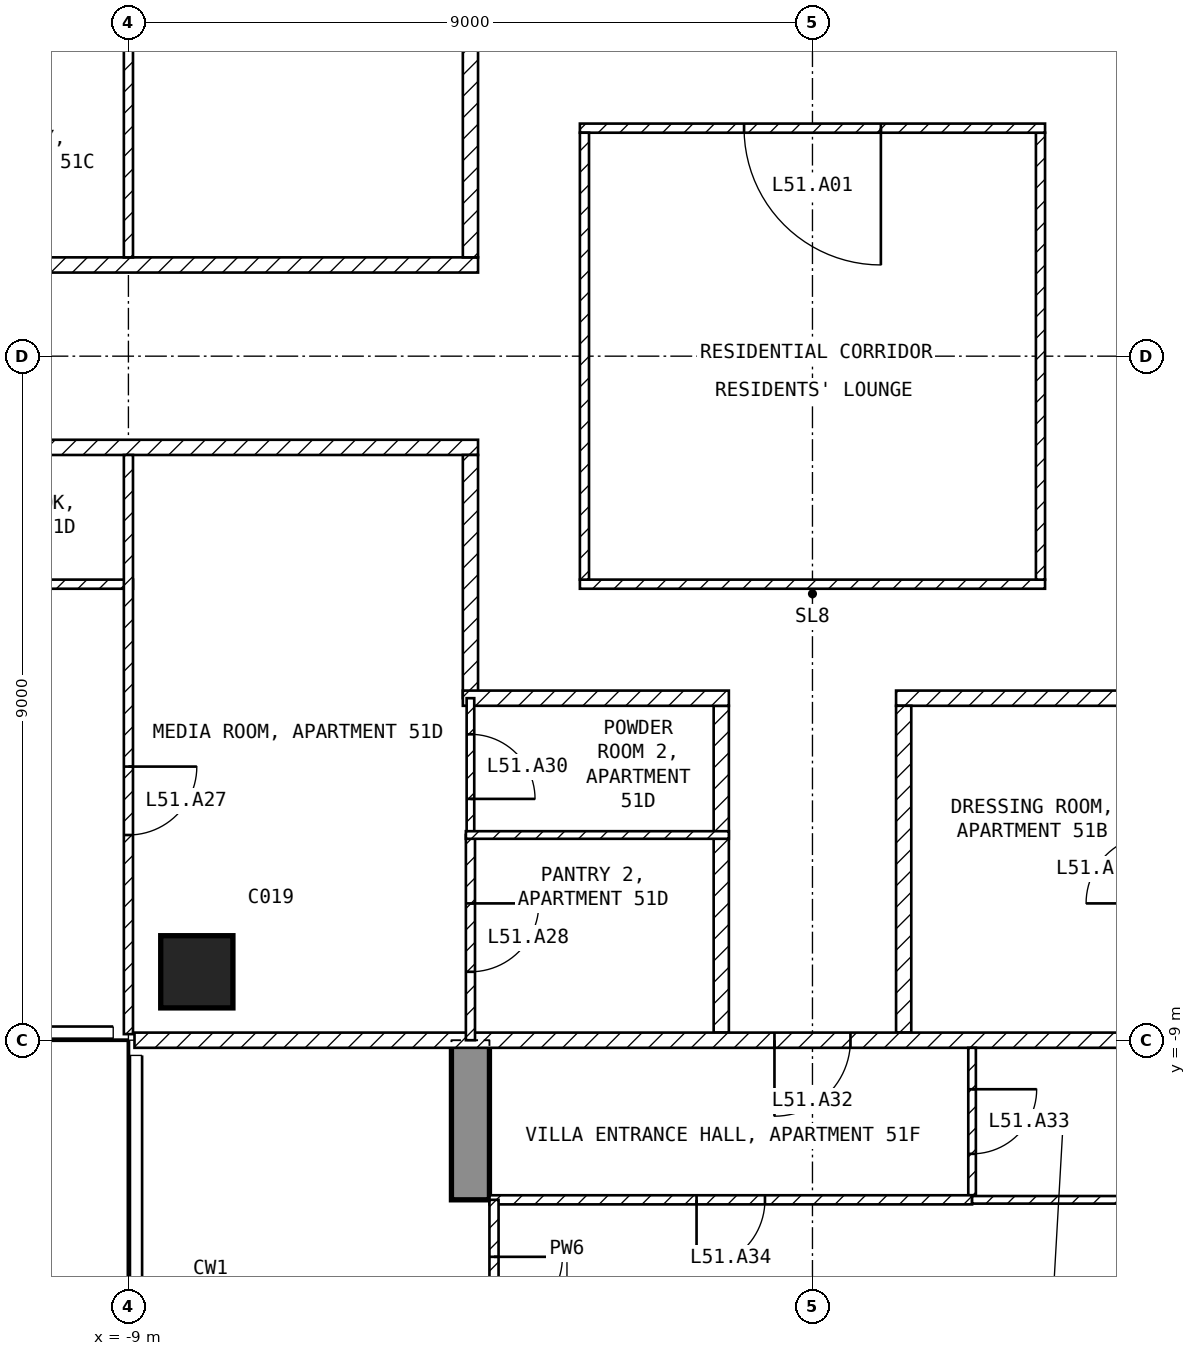
"""IFC4 building model, lengths in metres.
Left out: names, types, materials, properties, quantities, classifications, styles, units other than length and angle.
Written with IfcOpenShell. Run it as: python <this file> out.ifc"""

import sys

from ifc_helpers import new_model, si_unit, direction, frame, frame_2d, origin, origin_2d, place, context, subcontext, project, spatial, polyline, rectangle, outline, extrude, element, fill, save


model = new_model("IFC4")
c1 = context("Model", 3, precision=1e-05, world=origin(), true_north=direction((0.0, 1.0)))
c2 = subcontext(c1, "Body", "Model", "MODEL_VIEW")
j1 = project(units=[si_unit("LENGTHUNIT", "METRE"), si_unit("PLANEANGLEUNIT", "RADIAN")], contexts=[c1])
p1 = place(None, origin())
s1 = spatial("IfcSite", under=j1, at=p1, CompositionType="ELEMENT")
p2 = place(p1, origin())
s2 = spatial("IfcBuilding", under=s1, at=p2, CompositionType="ELEMENT")
p3 = place(p2, frame((0.0, 0.0, 205.1)))
s3 = spatial("IfcBuildingStorey", under=s2, at=p3, CompositionType="ELEMENT", Elevation=205.1)
p4 = place(p3, frame((-8.1, -8.1, -0.25), z_axis=(0.0, 0.0, 1.0), x_axis=(1.0, 0.0, 0.0)))
e1 = element("IfcColumn", 1, at=p4, inside=s3, PredefinedType="COLUMN", context=c2, shape_type="SweptSolid", body=[
    extrude(rectangle(XDim=0.95, YDim=0.95, at=origin_2d()), origin(), (0.0, 0.0, 1.0), 3.5),
])
p5 = place(p3, frame((-4.75, -20.225, -0.25), z_axis=(1.0, 0.0, 0.0), x_axis=(0.0, 1.0, 0.0)))
e2 = element("IfcWall", 2, at=p5, inside=s3, PredefinedType="SHEAR", context=c2, shape_type="SweptSolid", body=[
    extrude(outline(polyline([(0.0, 0.0), (6.725, 0.0), (6.725, 2.65), (9.125, 2.65), (9.125, 0.0), (11.225, 0.0), (11.225, 3.5), (0.0, 3.5), (0.0, 0.0)])), origin(), (0.0, 0.0, 1.0), 0.5),
])
p6 = place(p3, frame((-3.06, -3.0, 0.0), z_axis=(0.0, 0.0, 1.0), x_axis=(1.0, 0.0, 0.0)))
e3 = element("IfcWall", 3, at=p6, inside=s3, PredefinedType="PARTITIONING", context=c2, shape_type="SweptSolid", body=[
    extrude(rectangle(XDim=6.12, YDim=0.12, at=frame_2d((3.06, 0.0))), origin(), (0.0, 0.0, 1.0), 3.25),
])
p7 = place(p3, frame((3.0, -2.94, 0.0), z_axis=(0.0, 0.0, 1.0), x_axis=(0.0, 1.0, 0.0)))
e4 = element("IfcWall", 4, at=p7, inside=s3, PredefinedType="PARTITIONING", context=c2, shape_type="SweptSolid", body=[
    extrude(rectangle(XDim=5.88, YDim=0.12, at=frame_2d((2.94, 0.0))), origin(), (0.0, 0.0, 1.0), 3.25),
])
p8 = place(p3, frame((3.06, 3.0, 0.0), z_axis=(0.0, 0.0, 1.0), x_axis=(-1.0, 0.0, 0.0)))
e5 = element("IfcWall", 5, at=p8, inside=s3, PredefinedType="PARTITIONING", context=c2, shape_type="SweptSolid", body=[
    extrude(rectangle(XDim=6.12, YDim=0.12, at=frame_2d((3.06, 0.0))), origin(), (0.0, 0.0, 1.0), 3.25),
])
p9 = place(p8, frame((2.16, 0.0, 0.0)))
e6 = element("IfcOpeningElement", 6, at=p9, cuts=e5, PredefinedType="OPENING", context=c2, shape_type="SweptSolid", body=[
    extrude(rectangle(XDim=1.8, YDim=2.1, at=frame_2d((0.9, 1.05))), frame((0.0, 0.07, 0.0), z_axis=(0.0, -1.0, 0.0), x_axis=(1.0, 0.0, 0.0)), (0.0, 0.0, 1.0), 0.14),
])
p10 = place(p3, frame((-3.0, 2.94, 0.0), z_axis=(0.0, 0.0, 1.0), x_axis=(0.0, -1.0, 0.0)))
e7 = element("IfcWall", 7, at=p10, inside=s3, PredefinedType="PARTITIONING", context=c2, shape_type="SweptSolid", body=[
    extrude(rectangle(XDim=5.88, YDim=0.12, at=frame_2d((2.94, 0.0))), origin(), (0.0, 0.0, 1.0), 3.25),
])
p11 = place(p3, frame((4.6, -4.5, 0.0), z_axis=(0.0, 0.0, 1.0), x_axis=(-1.0, 0.0, 0.0)))
e8 = element("IfcWall", 8, at=p11, inside=s3, PredefinedType="PARTITIONING", context=c2, shape_type="SweptSolid", body=[
    extrude(rectangle(XDim=3.5, YDim=0.2, at=frame_2d((1.75, 0.0))), origin(), (0.0, 0.0, 1.0), 3.25),
])
p12 = place(p3, frame((1.2, -4.6, 0.0), z_axis=(0.0, 0.0, 1.0), x_axis=(0.0, -1.0, 0.0)))
e9 = element("IfcWall", 9, at=p12, inside=s3, PredefinedType="PARTITIONING", context=c2, shape_type="SweptSolid", body=[
    extrude(rectangle(XDim=4.3, YDim=0.2, at=frame_2d((2.15, 0.0))), origin(), (0.0, 0.0, 1.0), 3.25),
])
p13 = place(p3, frame((-21.6, 1.2, 0.0), z_axis=(0.0, 0.0, 1.0), x_axis=(1.0, 0.0, 0.0)))
e10 = element("IfcWall", 10, at=p13, inside=s3, PredefinedType="PARTITIONING", context=c2, shape_type="SweptSolid", body=[
    extrude(rectangle(XDim=17.2, YDim=0.2, at=frame_2d((8.6, 0.0))), origin(), (0.0, 0.0, 1.0), 3.25),
])
p14 = place(p13, frame((7.75, 0.0, 0.0)))
e11 = element("IfcOpeningElement", 11, at=p14, cuts=e10, PredefinedType="OPENING", context=c2, shape_type="SweptSolid", body=[
    extrude(rectangle(XDim=1.0, YDim=2.1, at=frame_2d((0.5, 1.05))), frame((0.0, 0.11, 0.0), z_axis=(0.0, -1.0, 0.0), x_axis=(1.0, 0.0, 0.0)), (0.0, 0.0, 1.0), 0.22),
])
p15 = place(p3, frame((-4.5, 1.3, 0.0), z_axis=(0.0, 0.0, 1.0), x_axis=(0.0, 1.0, 0.0)))
e12 = element("IfcWall", 12, at=p15, inside=s3, PredefinedType="PARTITIONING", context=c2, shape_type="SweptSolid", body=[
    extrude(rectangle(XDim=3.2, YDim=0.2, at=frame_2d((1.6, 0.0))), origin(), (0.0, 0.0, 1.0), 3.25),
])
p16 = place(p3, frame((-4.4, -1.2, 0.0), z_axis=(0.0, 0.0, 1.0), x_axis=(-1.0, 0.0, 0.0)))
e13 = element("IfcWall", 13, at=p16, inside=s3, PredefinedType="PARTITIONING", context=c2, shape_type="SweptSolid", body=[
    extrude(rectangle(XDim=17.2, YDim=0.2, at=frame_2d((8.6, 0.0))), origin(), (0.0, 0.0, 1.0), 3.25),
])
p17 = place(p16, frame((9.125, 0.0, 0.0)))
e14 = element("IfcOpeningElement", 14, at=p17, cuts=e13, PredefinedType="OPENING", context=c2, shape_type="SweptSolid", body=[
    extrude(rectangle(XDim=1.0, YDim=2.1, at=frame_2d((0.5, 1.05))), frame((0.0, 0.11, 0.0), z_axis=(0.0, -1.0, 0.0), x_axis=(1.0, 0.0, 0.0)), (0.0, 0.0, 1.0), 0.22),
])
p18 = place(p3, frame((-4.5, -4.5, 0.0), z_axis=(0.0, 0.0, 1.0), x_axis=(0.0, 1.0, 0.0)))
e15 = element("IfcWall", 15, at=p18, inside=s3, PredefinedType="PARTITIONING", context=c2, shape_type="SweptSolid", body=[
    extrude(rectangle(XDim=3.2, YDim=0.2, at=frame_2d((1.6, 0.0))), origin(), (0.0, 0.0, 1.0), 3.25),
])
p19 = place(p3, frame((-1.2, -8.9, 0.0), z_axis=(0.0, 0.0, 1.0), x_axis=(0.0, 1.0, 0.0)))
e16 = element("IfcWall", 16, at=p19, inside=s3, PredefinedType="PARTITIONING", context=c2, shape_type="SweptSolid", body=[
    extrude(rectangle(XDim=4.3, YDim=0.2, at=frame_2d((2.15, 0.0))), origin(), (0.0, 0.0, 1.0), 3.25),
])
p20 = place(p3, frame((-1.1, -4.5, 0.0), z_axis=(0.0, 0.0, 1.0), x_axis=(-1.0, 0.0, 0.0)))
e17 = element("IfcWall", 17, at=p20, inside=s3, PredefinedType="PARTITIONING", context=c2, shape_type="SweptSolid", body=[
    extrude(rectangle(XDim=3.5, YDim=0.2, at=frame_2d((1.75, 0.0))), origin(), (0.0, 0.0, 1.0), 3.25),
])
p21 = place(p3, frame((8.92, -9.0, 0.0), z_axis=(0.0, 0.0, 1.0), x_axis=(-1.0, 0.0, 0.0)))
e18 = element("IfcWall", 18, at=p21, inside=s3, PredefinedType="PARTITIONING", context=c2, shape_type="SweptSolid", body=[
    extrude(rectangle(XDim=17.84, YDim=0.2, at=frame_2d((8.92, 0.0))), origin(), (0.0, 0.0, 1.0), 3.25),
])
p22 = place(p21, frame((8.42, 0.0, 0.0)))
e19 = element("IfcOpeningElement", 19, at=p22, cuts=e18, PredefinedType="OPENING", context=c2, shape_type="SweptSolid", body=[
    extrude(rectangle(XDim=1.0, YDim=2.1, at=frame_2d((0.5, 1.05))), frame((0.0, 0.11, 0.0), z_axis=(0.0, -1.0, 0.0), x_axis=(1.0, 0.0, 0.0)), (0.0, 0.0, 1.0), 0.22),
])
p23 = place(p3, frame((-9.0, 8.92, 0.0), z_axis=(0.0, 0.0, 1.0), x_axis=(0.0, -1.0, 0.0)))
e20 = element("IfcWall", 20, at=p23, inside=s3, PredefinedType="PARTITIONING", context=c2, shape_type="SweptSolid", body=[
    extrude(rectangle(XDim=7.62, YDim=0.12, at=frame_2d((3.81, 0.0))), origin(), (0.0, 0.0, 1.0), 3.25),
])
p24 = place(p23, frame((2.52, 0.0, 0.0)))
e21 = element("IfcOpeningElement", 21, at=p24, cuts=e20, PredefinedType="OPENING", context=c2, shape_type="SweptSolid", body=[
    extrude(rectangle(XDim=0.9, YDim=2.1, at=frame_2d((0.45, 1.05))), frame((0.0, 0.07, 0.0), z_axis=(0.0, -1.0, 0.0), x_axis=(1.0, 0.0, 0.0)), (0.0, 0.0, 1.0), 0.14),
])
p25 = place(p3, frame((-8.94, -3.0, 0.0), z_axis=(0.0, 0.0, 1.0), x_axis=(-1.0, 0.0, 0.0)))
e22 = element("IfcWall", 22, at=p25, inside=s3, PredefinedType="PARTITIONING", context=c2, shape_type="SweptSolid", body=[
    extrude(rectangle(XDim=6.81, YDim=0.12, at=frame_2d((3.405, 0.0))), origin(), (0.0, 0.0, 1.0), 3.25),
])
p26 = place(p25, frame((4.11, 0.0, 0.0)))
e23 = element("IfcOpeningElement", 23, at=p26, cuts=e22, PredefinedType="OPENING", context=c2, shape_type="SweptSolid", body=[
    extrude(rectangle(XDim=0.9, YDim=2.1, at=frame_2d((0.45, 1.05))), frame((0.0, 0.07, 0.0), z_axis=(0.0, -1.0, 0.0), x_axis=(1.0, 0.0, 0.0)), (0.0, 0.0, 1.0), 0.14),
])
p27 = place(p3, frame((-9.0, -1.3, 0.0), z_axis=(0.0, 0.0, 1.0), x_axis=(0.0, -1.0, 0.0)))
e24 = element("IfcWall", 24, at=p27, inside=s3, PredefinedType="PARTITIONING", context=c2, shape_type="SweptSolid", body=[
    extrude(rectangle(XDim=7.62, YDim=0.12, at=frame_2d((3.81, 0.0))), origin(), (0.0, 0.0, 1.0), 3.25),
])
p28 = place(p27, frame((4.1, 0.0, 0.0)))
e25 = element("IfcOpeningElement", 25, at=p28, cuts=e24, PredefinedType="OPENING", context=c2, shape_type="SweptSolid", body=[
    extrude(rectangle(XDim=0.9, YDim=2.1, at=frame_2d((0.45, 1.05))), frame((0.0, 0.07, 0.0), z_axis=(0.0, -1.0, 0.0), x_axis=(1.0, 0.0, 0.0)), (0.0, 0.0, 1.0), 0.14),
])
p29 = place(p3, frame((-4.5, -4.5, 0.0), z_axis=(0.0, 0.0, 1.0), x_axis=(0.0, -1.0, 0.0)))
e26 = element("IfcWall", 26, at=p29, inside=s3, PredefinedType="PARTITIONING", context=c2, shape_type="SweptSolid", body=[
    extrude(rectangle(XDim=1.8, YDim=0.1, at=frame_2d((0.9, 0.0))), origin(), (0.0, 0.0, 1.0), 3.25),
])
p30 = place(p29, frame((0.475, 0.0, 0.0)))
e27 = element("IfcOpeningElement", 27, at=p30, cuts=e26, PredefinedType="OPENING", context=c2, shape_type="SweptSolid", body=[
    extrude(rectangle(XDim=0.85, YDim=2.1, at=frame_2d((0.425, 1.05))), frame((0.0, 0.06, 0.0), z_axis=(0.0, -1.0, 0.0), x_axis=(1.0, 0.0, 0.0)), (0.0, 0.0, 1.0), 0.12),
])
p31 = place(p3, frame((-4.5, -6.3, 0.0), z_axis=(0.0, 0.0, 1.0), x_axis=(0.0, -1.0, 0.0)))
e28 = element("IfcWall", 28, at=p31, inside=s3, PredefinedType="PARTITIONING", context=c2, shape_type="SweptSolid", body=[
    extrude(rectangle(XDim=2.7, YDim=0.12, at=frame_2d((1.35, 0.0))), origin(), (0.0, 0.0, 1.0), 3.25),
])
p32 = place(p31, frame((0.9, 0.0, 0.0)))
e29 = element("IfcOpeningElement", 29, at=p32, cuts=e28, PredefinedType="OPENING", context=c2, shape_type="SweptSolid", body=[
    extrude(rectangle(XDim=0.9, YDim=2.1, at=frame_2d((0.45, 1.05))), frame((0.0, 0.07, 0.0), z_axis=(0.0, -1.0, 0.0), x_axis=(1.0, 0.0, 0.0)), (0.0, 0.0, 1.0), 0.14),
])
p33 = place(p3, frame((-1.1, -6.3, 0.0), z_axis=(0.0, 0.0, 1.0), x_axis=(-1.0, 0.0, 0.0)))
e30 = element("IfcWall", 30, at=p33, inside=s3, PredefinedType="PARTITIONING", context=c2, shape_type="SweptSolid", body=[
    extrude(rectangle(XDim=3.46, YDim=0.1, at=frame_2d((1.73, 0.0))), origin(), (0.0, 0.0, 1.0), 3.25),
])
p34 = place(p3, frame((2.1, -9.1, 0.0), z_axis=(0.0, 0.0, 1.0), x_axis=(0.0, -1.0, 0.0)))
e31 = element("IfcWall", 31, at=p34, inside=s3, PredefinedType="PARTITIONING", context=c2, shape_type="SweptSolid", body=[
    extrude(rectangle(XDim=1.94, YDim=0.1, at=frame_2d((0.97, 0.0))), origin(), (0.0, 0.0, 1.0), 3.25),
])
p35 = place(p34, frame((0.545, 0.0, 0.0)))
e32 = element("IfcOpeningElement", 32, at=p35, cuts=e31, PredefinedType="OPENING", context=c2, shape_type="SweptSolid", body=[
    extrude(rectangle(XDim=0.85, YDim=2.1, at=frame_2d((0.425, 1.05))), frame((0.0, 0.06, 0.0), z_axis=(0.0, -1.0, 0.0), x_axis=(1.0, 0.0, 0.0)), (0.0, 0.0, 1.0), 0.12),
])
p36 = place(p3, frame((2.1, -11.1, 0.0), z_axis=(0.0, 0.0, 1.0), x_axis=(-1.0, 0.0, 0.0)))
e33 = element("IfcWall", 33, at=p36, inside=s3, PredefinedType="PARTITIONING", context=c2, shape_type="SweptSolid", body=[
    extrude(rectangle(XDim=6.35, YDim=0.12, at=frame_2d((3.175, 0.0))), origin(), (0.0, 0.0, 1.0), 3.25),
])
p37 = place(p36, frame((2.725, 0.0, 0.0)))
e34 = element("IfcOpeningElement", 34, at=p37, cuts=e33, PredefinedType="OPENING", context=c2, shape_type="SweptSolid", body=[
    extrude(rectangle(XDim=0.9, YDim=2.1, at=frame_2d((0.45, 1.05))), frame((0.0, 0.07, 0.0), z_axis=(0.0, -1.0, 0.0), x_axis=(1.0, 0.0, 0.0)), (0.0, 0.0, 1.0), 0.14),
])
p38 = place(p3, frame((4.25, -11.1, 0.0), z_axis=(0.0, 0.0, 1.0), x_axis=(-1.0, 0.0, 0.0)))
e35 = element("IfcWall", 35, at=p38, inside=s3, PredefinedType="PARTITIONING", context=c2, shape_type="SweptSolid", body=[
    extrude(rectangle(XDim=2.15, YDim=0.1, at=frame_2d((1.075, 0.0))), origin(), (0.0, 0.0, 1.0), 3.25),
])
p39 = place(p3, frame((-4.19, -11.1, 0.0), z_axis=(0.0, 0.0, 1.0), x_axis=(0.0, -1.0, 0.0)))
e36 = element("IfcWall", 36, at=p39, inside=s3, PredefinedType="PARTITIONING", context=c2, shape_type="SweptSolid", body=[
    extrude(rectangle(XDim=2.4, YDim=0.12, at=frame_2d((1.2, 0.0))), origin(), (0.0, 0.0, 1.0), 2.4),
])
p40 = place(p39, frame((0.75, 0.0, 0.0)))
e37 = element("IfcOpeningElement", 37, at=p40, cuts=e36, PredefinedType="OPENING", context=c2, shape_type="SweptSolid", body=[
    extrude(rectangle(XDim=0.9, YDim=2.1, at=frame_2d((0.45, 1.05))), frame((0.0, 0.07, 0.0), z_axis=(0.0, -1.0, 0.0), x_axis=(1.0, 0.0, 0.0)), (0.0, 0.0, 1.0), 0.14),
])
p41 = place(p9, origin())
e38 = element("IfcDoor", 38, at=p41, inside=s3, OperationType="SINGLE_SWING_LEFT", PredefinedType="DOOR", context=c2, shape_type="SweptSolid", body=[
    extrude(rectangle(XDim=1.8, YDim=2.1, at=frame_2d((0.9, 1.05))), frame((0.0, 0.025, 0.0), z_axis=(0.0, -1.0, 0.0), x_axis=(1.0, 0.0, 0.0)), (0.0, 0.0, 1.0), 0.05),
])
fill(e6, e38)
p42 = place(p28, origin())
e39 = element("IfcDoor", 39, at=p42, inside=s3, OperationType="SINGLE_SWING_LEFT", PredefinedType="DOOR", context=c2, shape_type="SweptSolid", body=[
    extrude(rectangle(XDim=0.9, YDim=2.1, at=frame_2d((0.45, 1.05))), frame((0.0, 0.025, 0.0), z_axis=(0.0, -1.0, 0.0), x_axis=(1.0, 0.0, 0.0)), (0.0, 0.0, 1.0), 0.05),
])
fill(e25, e39)
p43 = place(p32, origin())
e40 = element("IfcDoor", 40, at=p43, inside=s3, OperationType="SINGLE_SWING_LEFT", PredefinedType="DOOR", context=c2, shape_type="SweptSolid", body=[
    extrude(rectangle(XDim=0.9, YDim=2.1, at=frame_2d((0.45, 1.05))), frame((0.0, 0.025, 0.0), z_axis=(0.0, -1.0, 0.0), x_axis=(1.0, 0.0, 0.0)), (0.0, 0.0, 1.0), 0.05),
])
fill(e29, e40)
p44 = place(p30, origin())
e41 = element("IfcDoor", 41, at=p44, inside=s3, OperationType="SINGLE_SWING_RIGHT", PredefinedType="DOOR", context=c2, shape_type="SweptSolid", body=[
    extrude(rectangle(XDim=0.85, YDim=2.1, at=frame_2d((0.425, 1.05))), frame((0.0, 0.025, 0.0), z_axis=(0.0, -1.0, 0.0), x_axis=(1.0, 0.0, 0.0)), (0.0, 0.0, 1.0), 0.05),
])
fill(e27, e41)
p45 = place(p22, origin())
e42 = element("IfcDoor", 42, at=p45, inside=s3, OperationType="SINGLE_SWING_RIGHT", PredefinedType="DOOR", context=c2, shape_type="SweptSolid", body=[
    extrude(rectangle(XDim=1.0, YDim=2.1, at=frame_2d((0.5, 1.05))), frame((0.0, 0.025, 0.0), z_axis=(0.0, -1.0, 0.0), x_axis=(1.0, 0.0, 0.0)), (0.0, 0.0, 1.0), 0.05),
])
fill(e19, e42)
p46 = place(p35, origin())
e43 = element("IfcDoor", 43, at=p46, inside=s3, OperationType="SINGLE_SWING_LEFT", PredefinedType="DOOR", context=c2, shape_type="SweptSolid", body=[
    extrude(rectangle(XDim=0.85, YDim=2.1, at=frame_2d((0.425, 1.05))), frame((0.0, 0.025, 0.0), z_axis=(0.0, -1.0, 0.0), x_axis=(1.0, 0.0, 0.0)), (0.0, 0.0, 1.0), 0.05),
])
fill(e32, e43)
p47 = place(p37, origin())
e44 = element("IfcDoor", 44, at=p47, inside=s3, OperationType="SINGLE_SWING_RIGHT", PredefinedType="DOOR", context=c2, shape_type="SweptSolid", body=[
    extrude(rectangle(XDim=0.9, YDim=2.1, at=frame_2d((0.45, 1.05))), frame((0.0, 0.025, 0.0), z_axis=(0.0, -1.0, 0.0), x_axis=(1.0, 0.0, 0.0)), (0.0, 0.0, 1.0), 0.05),
])
fill(e34, e44)
p48 = place(p40, origin())
e45 = element("IfcDoor", 45, at=p48, inside=s3, OperationType="SINGLE_SWING_LEFT", PredefinedType="DOOR", context=c2, shape_type="SweptSolid", body=[
    extrude(rectangle(XDim=0.9, YDim=2.1, at=frame_2d((0.45, 1.05))), frame((0.0, 0.025, 0.0), z_axis=(0.0, -1.0, 0.0), x_axis=(1.0, 0.0, 0.0)), (0.0, 0.0, 1.0), 0.05),
])
fill(e37, e45)
save(model, sys.argv[1])
